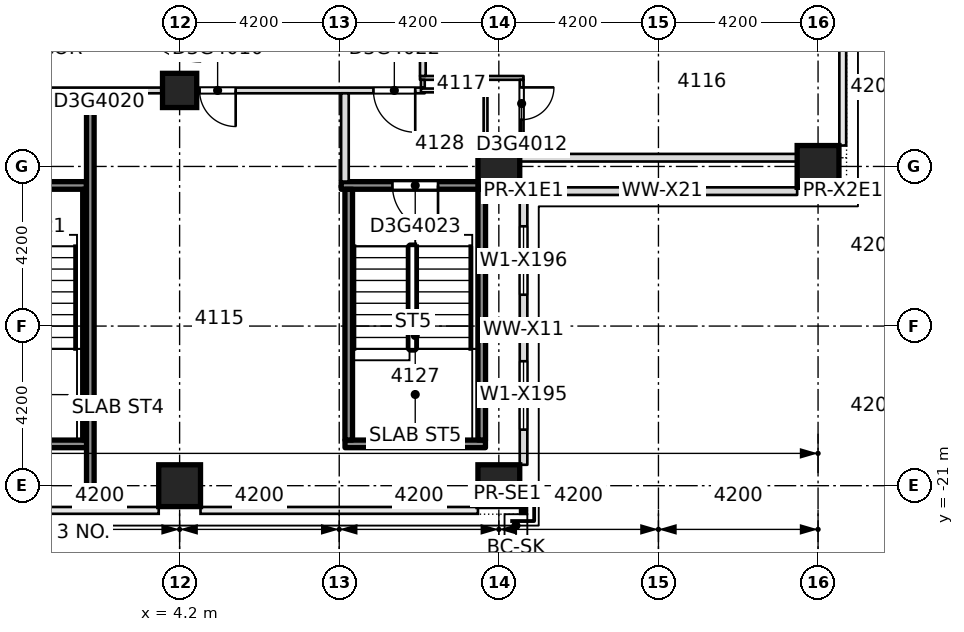
"""IFC4 building model, lengths in metres.
Left out: names, types, materials, properties, quantities, classifications, styles, units other than length and angle.
Written with IfcOpenShell. Run it as: python <this file> out.ifc"""

import sys

from ifc_helpers import new_model, si_unit, direction, frame, frame_2d, origin, origin_2d, place, context, subcontext, project, spatial, rectangle, extrude, element, fill, save


model = new_model("IFC4")
c1 = context("Model", 3, precision=1e-05, world=origin(), true_north=direction((0.0, 1.0)))
c2 = subcontext(c1, "Body", "Model", "MODEL_VIEW")
j1 = project(units=[si_unit("LENGTHUNIT", "METRE"), si_unit("PLANEANGLEUNIT", "RADIAN")], contexts=[c1])
p1 = place(None, origin())
s1 = spatial("IfcSite", under=j1, at=p1, CompositionType="ELEMENT")
p2 = place(p1, origin())
s2 = spatial("IfcBuilding", under=s1, at=p2, CompositionType="ELEMENT")
p3 = place(p2, frame((0.0, 0.0, 160.7)))
s3 = spatial("IfcBuildingStorey", under=s2, at=p3, CompositionType="ELEMENT", Elevation=160.7)
for number, where, z_axis, x_axis in (
    (1, (4.2, -21.0, -0.4), (0.0, 0.0, 1.0), (1.0, 0.0, 0.0)),
    (2, (12.6, -21.0, -0.4), (0.0, 0.0, 1.0), (1.0, 0.0, 0.0)),
    (3, (12.6, -12.6, -0.4), (0.0, 0.0, 1.0), (1.0, 0.0, 0.0)),
    (4, (21.0, -12.6, -0.4), (0.0, 0.0, 1.0), (1.0, 0.0, 0.0)),
):
    element("IfcColumn", number, at=place(p3, frame(where, z_axis=z_axis, x_axis=x_axis)), inside=s3, PredefinedType="COLUMN", context=c2, shape_type="SweptSolid", body=[
        extrude(rectangle(XDim=1.1, YDim=1.1, at=origin_2d()), origin(), (0.0, 0.0, 1.0), 3.45),
    ])
p4 = place(p3, frame((4.2, -10.6, -0.4), z_axis=(0.0, 0.0, 1.0), x_axis=(1.0, 0.0, 0.0)))
e5 = element("IfcColumn", 5, at=p4, inside=s3, PredefinedType="COLUMN", context=c2, shape_type="SweptSolid", body=[
    extrude(rectangle(XDim=0.9, YDim=0.9, at=origin_2d()), origin(), (0.0, 0.0, 1.0), 3.45),
])
p5 = place(p3, frame((-1.848, -19.9, 0.0), z_axis=(0.0, 0.0, 1.0), x_axis=(1.0, 0.0, 0.0)))
e6 = element("IfcWall", 6, at=p5, inside=s3, PredefinedType="SOLIDWALL", context=c2, shape_type="SweptSolid", body=[
    extrude(rectangle(XDim=3.696, YDim=0.2, at=frame_2d((1.848, 0.0))), origin(), (0.0, 0.0, 1.0), 3.05),
])
p6 = place(p3, frame((8.552, -19.9, 0.0), z_axis=(0.0, 0.0, 1.0), x_axis=(1.0, 0.0, 0.0)))
e7 = element("IfcWall", 7, at=p6, inside=s3, PredefinedType="SOLIDWALL", context=c2, shape_type="SweptSolid", body=[
    extrude(rectangle(XDim=3.696, YDim=0.2, at=frame_2d((1.848, 0.0))), origin(), (0.0, 0.0, 1.0), 3.05),
])
p7 = place(p3, frame((-1.948, -13.1, 0.0), z_axis=(0.0, 0.0, 1.0), x_axis=(1.0, 0.0, 0.0)))
e8 = element("IfcWall", 8, at=p7, inside=s3, PredefinedType="SOLIDWALL", context=c2, shape_type="SweptSolid", body=[
    extrude(rectangle(XDim=3.696, YDim=0.2, at=frame_2d((1.848, 0.0))), origin(), (0.0, 0.0, 1.0), 3.05),
])
p8 = place(p7, frame((1.348, 0.0, 0.0)))
e9 = element("IfcOpeningElement", 9, at=p8, cuts=e8, PredefinedType="OPENING", context=c2, shape_type="SweptSolid", body=[
    extrude(rectangle(XDim=1.2, YDim=2.1, at=frame_2d((0.6, 1.05))), frame((0.0, 0.11, 0.0), z_axis=(0.0, -1.0, 0.0), x_axis=(1.0, 0.0, 0.0)), (0.0, 0.0, 1.0), 0.22),
])
p9 = place(p3, frame((8.452, -13.1, 0.0), z_axis=(0.0, 0.0, 1.0), x_axis=(1.0, 0.0, 0.0)))
e10 = element("IfcWall", 10, at=p9, inside=s3, PredefinedType="SOLIDWALL", context=c2, shape_type="SweptSolid", body=[
    extrude(rectangle(XDim=3.896, YDim=0.2, at=frame_2d((1.948, 0.0))), origin(), (0.0, 0.0, 1.0), 3.05),
])
p10 = place(p9, frame((1.348, 0.0, 0.0)))
e11 = element("IfcOpeningElement", 11, at=p10, cuts=e10, PredefinedType="OPENING", context=c2, shape_type="SweptSolid", body=[
    extrude(rectangle(XDim=1.2, YDim=2.1, at=frame_2d((0.6, 1.05))), frame((0.0, 0.11, 0.0), z_axis=(0.0, -1.0, 0.0), x_axis=(1.0, 0.0, 0.0)), (0.0, 0.0, 1.0), 0.22),
])
p11 = place(p3, frame((12.152, -12.37, 0.0), z_axis=(0.0, 0.0, 1.0), x_axis=(1.0, 0.0, 0.0)))
e12 = element("IfcWall", 12, at=p11, inside=s3, PredefinedType="PARTITIONING", context=c2, shape_type="SweptSolid", body=[
    extrude(rectangle(XDim=1.098, YDim=0.1, at=frame_2d((0.549, 0.0))), origin(), (0.0, 0.0, 1.0), 3.05),
])
p12 = place(p3, frame((-10.6, -10.6, 0.0), z_axis=(0.0, 0.0, 1.0), x_axis=(1.0, 0.0, 0.0)))
e13 = element("IfcWall", 13, at=p12, inside=s3, PredefinedType="PARTITIONING", context=c2, shape_type="SweptSolid", body=[
    extrude(rectangle(XDim=21.25, YDim=0.15, at=frame_2d((10.625, 0.0))), origin(), (0.0, 0.0, 1.0), 3.05),
])
p13 = place(p12, frame((4.925, 0.0, 0.0)))
e14 = element("IfcOpeningElement", 14, at=p13, cuts=e13, PredefinedType="OPENING", context=c2, shape_type="SweptSolid", body=[
    extrude(rectangle(XDim=0.95, YDim=2.1, at=frame_2d((0.475, 1.05))), frame((0.0, 0.085, 0.0), z_axis=(0.0, -1.0, 0.0), x_axis=(1.0, 0.0, 0.0)), (0.0, 0.0, 1.0), 0.17),
])
p14 = place(p12, frame((15.325, 0.0, 0.0)))
e15 = element("IfcOpeningElement", 15, at=p14, cuts=e13, PredefinedType="OPENING", context=c2, shape_type="SweptSolid", body=[
    extrude(rectangle(XDim=0.95, YDim=2.1, at=frame_2d((0.475, 1.05))), frame((0.0, 0.085, 0.0), z_axis=(0.0, -1.0, 0.0), x_axis=(1.0, 0.0, 0.0)), (0.0, 0.0, 1.0), 0.17),
])
p15 = place(p12, frame((0.2, 0.0, 0.0)))
e16 = element("IfcOpeningElement", 16, at=p15, cuts=e13, PredefinedType="OPENING", context=c2, shape_type="SweptSolid", body=[
    extrude(rectangle(XDim=1.1, YDim=2.1, at=frame_2d((0.55, 1.05))), frame((0.0, 0.085, 0.0), z_axis=(0.0, -1.0, 0.0), x_axis=(1.0, 0.0, 0.0)), (0.0, 0.0, 1.0), 0.17),
])
p16 = place(p12, frame((10.05, 0.0, 0.0)))
e17 = element("IfcOpeningElement", 17, at=p16, cuts=e13, PredefinedType="OPENING", context=c2, shape_type="SweptSolid", body=[
    extrude(rectangle(XDim=1.1, YDim=2.1, at=frame_2d((0.55, 1.05))), frame((0.0, 0.085, 0.0), z_axis=(0.0, -1.0, 0.0), x_axis=(1.0, 0.0, 0.0)), (0.0, 0.0, 1.0), 0.17),
])
p17 = place(p12, frame((19.9, 0.0, 0.0)))
e18 = element("IfcOpeningElement", 18, at=p17, cuts=e13, PredefinedType="OPENING", context=c2, shape_type="SweptSolid", body=[
    extrude(rectangle(XDim=1.1, YDim=2.1, at=frame_2d((0.55, 1.05))), frame((0.0, 0.085, 0.0), z_axis=(0.0, -1.0, 0.0), x_axis=(1.0, 0.0, 0.0)), (0.0, 0.0, 1.0), 0.17),
])
p18 = place(p3, frame((10.55, -10.6, 0.0), z_axis=(0.0, 0.0, 1.0), x_axis=(1.0, 0.0, 0.0)))
e19 = element("IfcWall", 19, at=p18, inside=s3, PredefinedType="PARTITIONING", context=c2, shape_type="SweptSolid", body=[
    extrude(rectangle(XDim=1.75, YDim=0.1, at=frame_2d((0.875, 0.0))), origin(), (0.0, 0.0, 1.0), 3.05),
])
p19 = place(p3, frame((10.525, -10.27, 0.0), z_axis=(0.0, 0.0, 1.0), x_axis=(1.0, 0.0, 0.0)))
e20 = element("IfcWall", 20, at=p19, inside=s3, PredefinedType="PARTITIONING", context=c2, shape_type="SweptSolid", body=[
    extrude(rectangle(XDim=2.725, YDim=0.1, at=frame_2d((1.363, 0.0))), origin(), (0.0, 0.0, 1.0), 3.05),
])
p20 = place(p3, frame((1.75, -19.798, 0.0), z_axis=(0.0, 0.0, 1.0), x_axis=(0.0, 1.0, 0.0)))
e21 = element("IfcWall", 21, at=p20, inside=s3, PredefinedType="SOLIDWALL", context=c2, shape_type="SweptSolid", body=[
    extrude(rectangle(XDim=6.596, YDim=0.2, at=frame_2d((3.298, 0.0))), origin(), (0.0, 0.0, 1.0), 3.05),
])
p21 = place(p3, frame((8.55, -12.998, 0.0), z_axis=(0.0, 0.0, 1.0), x_axis=(0.0, 1.0, 0.0)))
e22 = element("IfcWall", 22, at=p21, inside=s3, PredefinedType="PARTITIONING", context=c2, shape_type="SweptSolid", body=[
    extrude(rectangle(XDim=2.323, YDim=0.2, at=frame_2d((1.162, 0.0))), origin(), (0.0, 0.0, 1.0), 3.05),
])
p22 = place(p3, frame((8.65, -19.798, 0.0), z_axis=(0.0, 0.0, 1.0), x_axis=(0.0, 1.0, 0.0)))
e23 = element("IfcWall", 23, at=p22, inside=s3, PredefinedType="SOLIDWALL", context=c2, shape_type="SweptSolid", body=[
    extrude(rectangle(XDim=6.596, YDim=0.2, at=frame_2d((3.298, 0.0))), origin(), (0.0, 0.0, 1.0), 3.05),
])
p23 = place(p3, frame((10.6, -10.525, 0.0), z_axis=(0.0, 0.0, 1.0), x_axis=(0.0, 1.0, 0.0)))
e24 = element("IfcWall", 24, at=p23, inside=s3, PredefinedType="PARTITIONING", context=c2, shape_type="SweptSolid", body=[
    extrude(rectangle(XDim=0.205, YDim=0.1, at=frame_2d((0.103, 0.0))), origin(), (0.0, 0.0, 1.0), 3.05),
])
p24 = place(p3, frame((10.6, -10.22, 0.0), z_axis=(0.0, 0.0, 1.0), x_axis=(0.0, 1.0, 0.0)))
e25 = element("IfcWall", 25, at=p24, inside=s3, PredefinedType="PARTITIONING", context=c2, shape_type="SweptSolid", body=[
    extrude(rectangle(XDim=1.745, YDim=0.15, at=frame_2d((0.873, 0.0))), origin(), (0.0, 0.0, 1.0), 3.05),
])
p25 = place(p3, frame((12.15, -19.798, 0.0), z_axis=(0.0, 0.0, 1.0), x_axis=(0.0, 1.0, 0.0)))
e26 = element("IfcWall", 26, at=p25, inside=s3, PredefinedType="SOLIDWALL", context=c2, shape_type="SweptSolid", body=[
    extrude(rectangle(XDim=6.596, YDim=0.2, at=frame_2d((3.298, 0.0))), origin(), (0.0, 0.0, 1.0), 3.05),
])
p26 = place(p3, frame((12.25, -12.998, 0.0), z_axis=(0.0, 0.0, 1.0), x_axis=(0.0, 1.0, 0.0)))
e27 = element("IfcWall", 27, at=p26, inside=s3, PredefinedType="PARTITIONING", context=c2, shape_type="SweptSolid", body=[
    extrude(rectangle(XDim=0.576, YDim=0.2, at=frame_2d((0.288, 0.0))), origin(), (0.0, 0.0, 1.0), 3.05),
])
p27 = place(p3, frame((12.25, -12.32, 0.0), z_axis=(0.0, 0.0, 1.0), x_axis=(0.0, 1.0, 0.0)))
e28 = element("IfcWall", 28, at=p27, inside=s3, PredefinedType="PARTITIONING", context=c2, shape_type="SweptSolid", body=[
    extrude(rectangle(XDim=1.67, YDim=0.1, at=frame_2d((0.835, 0.0))), origin(), (0.0, 0.0, 1.0), 3.05),
])
p28 = place(p3, frame((13.2, -12.27, 0.0), z_axis=(0.0, 0.0, 1.0), x_axis=(0.0, 1.0, 0.0)))
e29 = element("IfcWall", 29, at=p28, inside=s3, PredefinedType="PARTITIONING", context=c2, shape_type="SweptSolid", body=[
    extrude(rectangle(XDim=1.95, YDim=0.1, at=frame_2d((0.975, 0.0))), origin(), (0.0, 0.0, 1.0), 3.05),
])
p29 = place(p28, frame((0.9, 0.0, 0.0)))
e30 = element("IfcOpeningElement", 30, at=p29, cuts=e29, PredefinedType="OPENING", context=c2, shape_type="SweptSolid", body=[
    extrude(rectangle(XDim=0.85, YDim=2.1, at=frame_2d((0.425, 1.05))), frame((0.0, 0.06, 0.0), z_axis=(0.0, -1.0, 0.0), x_axis=(1.0, 0.0, 0.0)), (0.0, 0.0, 1.0), 0.12),
])
p30 = place(p3, frame((13.25, -20.45, 0.0), z_axis=(0.0, 0.0, 1.0), x_axis=(0.0, 1.0, 0.0)))
e31 = element("IfcWall", 31, at=p30, inside=s3, PredefinedType="STANDARD", context=c2, shape_type="SweptSolid", body=[
    extrude(rectangle(XDim=7.1, YDim=0.2, at=frame_2d((3.55, 0.0))), origin(), (0.0, 0.0, 1.0), 3.05),
])
p31 = place(p30, frame((0.925, 0.0, 0.2)))
e32 = element("IfcOpeningElement", 32, at=p31, cuts=e31, PredefinedType="OPENING", context=c2, shape_type="SweptSolid", body=[
    extrude(rectangle(XDim=1.8, YDim=2.65, at=frame_2d((0.9, 1.325))), frame((0.0, 0.11, 0.0), z_axis=(0.0, -1.0, 0.0), x_axis=(1.0, 0.0, 0.0)), (0.0, 0.0, 1.0), 0.22),
])
p32 = place(p30, frame((4.475, 0.0, 0.2)))
e33 = element("IfcOpeningElement", 33, at=p32, cuts=e31, PredefinedType="OPENING", context=c2, shape_type="SweptSolid", body=[
    extrude(rectangle(XDim=1.8, YDim=2.65, at=frame_2d((0.9, 1.325))), frame((0.0, 0.11, 0.0), z_axis=(0.0, -1.0, 0.0), x_axis=(1.0, 0.0, 0.0)), (0.0, 0.0, 1.0), 0.22),
])
p33 = place(p3, frame((13.35, -13.25, 0.0), z_axis=(0.0, 0.0, 1.0), x_axis=(1.0, 0.0, 0.0)))
e34 = element("IfcWall", 34, at=p33, inside=s3, PredefinedType="STANDARD", context=c2, shape_type="SweptSolid", body=[
    extrude(rectangle(XDim=7.1, YDim=0.2, at=frame_2d((3.55, 0.0))), origin(), (0.0, 0.0, 1.0), 3.05),
])
p34 = place(p3, frame((1.85, -21.55, 0.0), z_axis=(0.0, 0.0, 1.0), x_axis=(0.0, 1.0, 0.0)))
e35 = element("IfcWall", 35, at=p34, inside=s3, PredefinedType="SOLIDWALL", context=c2, shape_type="SweptSolid", body=[
    extrude(rectangle(XDim=10.875, YDim=0.2, at=frame_2d((5.438, 0.0))), origin(), (0.0, 0.0, 1.0), 3.05),
])
p35 = place(p3, frame((13.15, -12.37, 0.0), z_axis=(0.0, 0.0, 1.0), x_axis=(1.0, 0.0, 0.0)))
e36 = element("IfcWall", 36, at=p35, inside=s3, PredefinedType="PARTITIONING", context=c2, shape_type="SweptSolid", body=[
    extrude(rectangle(XDim=7.3, YDim=0.2, at=frame_2d((3.65, 0.0))), origin(), (0.0, 0.0, 1.0), 2.5),
])
p36 = place(p3, frame((20.45, -12.37, 0.0), z_axis=(0.0, 0.0, 1.0), x_axis=(1.0, 0.0, 0.0)))
e37 = element("IfcWall", 37, at=p36, inside=s3, PredefinedType="PARTITIONING", context=c2, shape_type="SweptSolid", body=[
    extrude(rectangle(XDim=1.1, YDim=0.2, at=frame_2d((0.55, 0.0))), origin(), (0.0, 0.0, 1.0), 3.05),
])
p37 = place(p14, origin())
e38 = element("IfcDoor", 38, at=p37, inside=s3, OperationType="SINGLE_SWING_LEFT", PredefinedType="DOOR", context=c2, shape_type="SweptSolid", body=[
    extrude(rectangle(XDim=0.95, YDim=2.1, at=frame_2d((0.475, 1.05))), frame((0.0, 0.025, 0.0), z_axis=(0.0, -1.0, 0.0), x_axis=(1.0, 0.0, 0.0)), (0.0, 0.0, 1.0), 0.05),
])
fill(e15, e38)
p38 = place(p29, origin())
e39 = element("IfcDoor", 39, at=p38, inside=s3, OperationType="SINGLE_SWING_LEFT", PredefinedType="DOOR", context=c2, shape_type="SweptSolid", body=[
    extrude(rectangle(XDim=0.85, YDim=2.1, at=frame_2d((0.425, 1.05))), frame((0.0, 0.025, 0.0), z_axis=(0.0, -1.0, 0.0), x_axis=(1.0, 0.0, 0.0)), (0.0, 0.0, 1.0), 0.05),
])
fill(e30, e39)
p39 = place(p17, origin())
e40 = element("IfcDoor", 40, at=p39, inside=s3, OperationType="SINGLE_SWING_LEFT", PredefinedType="DOOR", context=c2, shape_type="SweptSolid", body=[
    extrude(rectangle(XDim=1.1, YDim=2.1, at=frame_2d((0.55, 1.05))), frame((0.0, 0.025, 0.0), z_axis=(0.0, -1.0, 0.0), x_axis=(1.0, 0.0, 0.0)), (0.0, 0.0, 1.0), 0.05),
])
fill(e18, e40)
p40 = place(p10, origin())
e41 = element("IfcDoor", 41, at=p40, inside=s3, OperationType="SINGLE_SWING_RIGHT", PredefinedType="DOOR", context=c2, shape_type="SweptSolid", body=[
    extrude(rectangle(XDim=1.2, YDim=2.1, at=frame_2d((0.6, 1.05))), frame((0.0, 0.025, 0.0), z_axis=(0.0, -1.0, 0.0), x_axis=(1.0, 0.0, 0.0)), (0.0, 0.0, 1.0), 0.05),
])
fill(e11, e41)
p41 = place(p31, origin())
e42 = element("IfcWindow", 42, at=p41, inside=s3, PartitioningType="SINGLE_PANEL", PredefinedType="WINDOW", context=c2, shape_type="SweptSolid", body=[
    extrude(rectangle(XDim=1.8, YDim=2.65, at=frame_2d((0.9, 1.325))), frame((0.0, 0.03, 0.0), z_axis=(0.0, -1.0, 0.0), x_axis=(1.0, 0.0, 0.0)), (0.0, 0.0, 1.0), 0.06),
])
fill(e32, e42)
p42 = place(p32, origin())
e43 = element("IfcWindow", 43, at=p42, inside=s3, PartitioningType="SINGLE_PANEL", PredefinedType="WINDOW", context=c2, shape_type="SweptSolid", body=[
    extrude(rectangle(XDim=1.8, YDim=2.65, at=frame_2d((0.9, 1.325))), frame((0.0, 0.03, 0.0), z_axis=(0.0, -1.0, 0.0), x_axis=(1.0, 0.0, 0.0)), (0.0, 0.0, 1.0), 0.06),
])
fill(e33, e43)
save(model, sys.argv[1])
